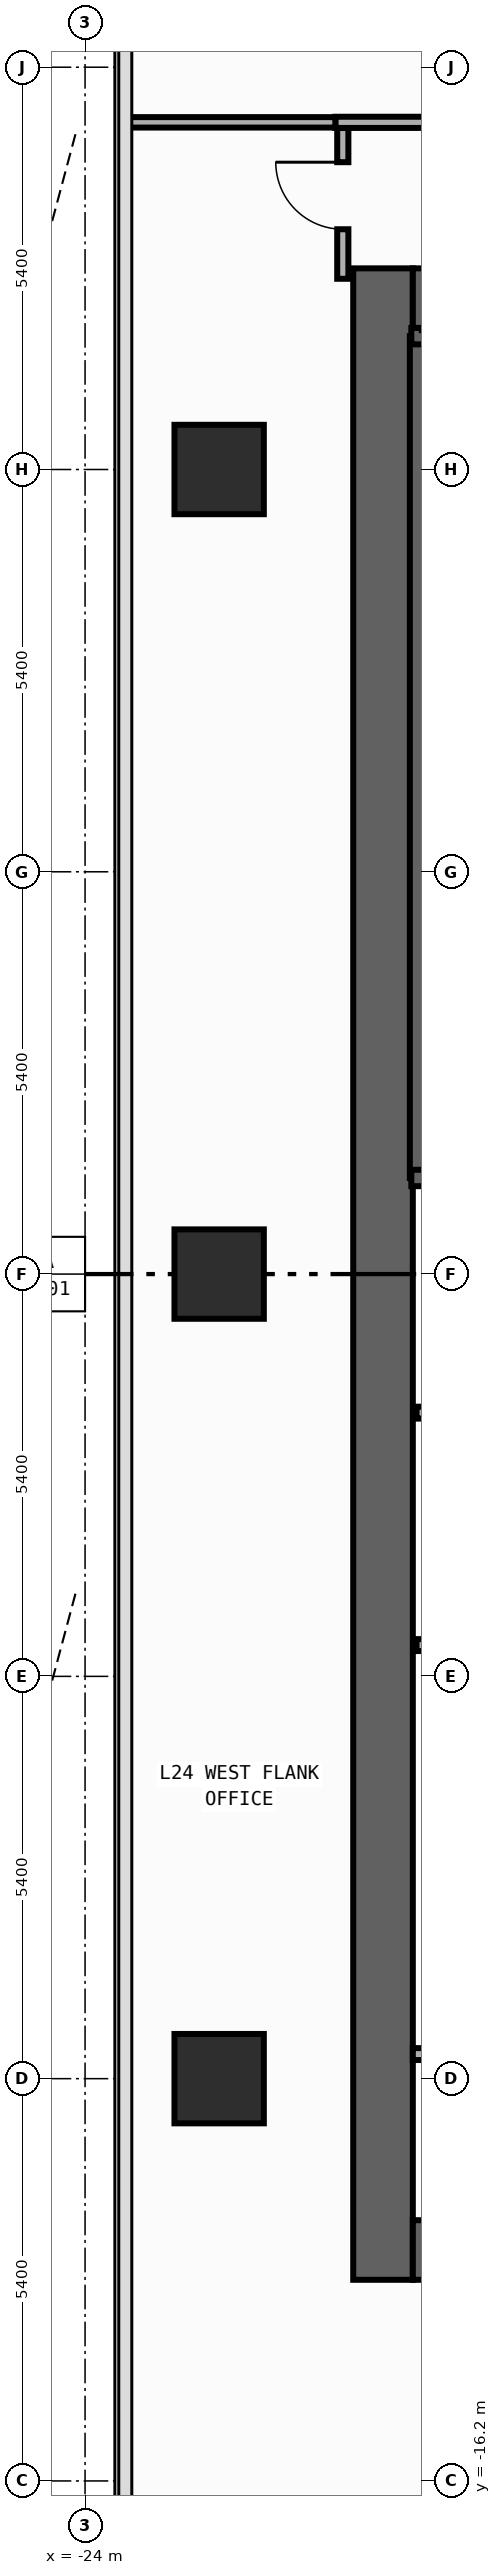
"""IFC4 building model, lengths in metres.
Left out: names, types, materials, properties, quantities, classifications, styles, units other than length and angle.
Written with IfcOpenShell. Run it as: python <this file> out.ifc"""

import sys

from ifc_helpers import new_model, si_unit, direction, frame, frame_2d, origin, origin_2d, place, context, subcontext, project, spatial, rectangle, extrude, element, fill, save


model = new_model("IFC4")
c1 = context("Model", 3, precision=1e-05, world=origin(), true_north=direction((0.0, 1.0)))
c2 = subcontext(c1, "Body", "Model", "MODEL_VIEW")
j1 = project(units=[si_unit("LENGTHUNIT", "METRE"), si_unit("PLANEANGLEUNIT", "RADIAN")], contexts=[c1])
p1 = place(None, origin())
s1 = spatial("IfcSite", under=j1, at=p1, CompositionType="ELEMENT")
p2 = place(p1, origin())
s2 = spatial("IfcBuilding", under=s1, at=p2, CompositionType="ELEMENT")
p3 = place(p2, frame((0.0, 0.0, 105.8)))
s3 = spatial("IfcBuildingStorey", under=s2, at=p3, CompositionType="ELEMENT", Elevation=105.8)
p4 = place(p3, frame((-20.0, -13.5, 0.0), z_axis=(0.0, 0.0, 1.0), x_axis=(0.0, 1.0, 0.0)))
e1 = element("IfcWall", 1, at=p4, inside=s3, PredefinedType="SHEAR", context=c2, shape_type="SweptSolid", body=[
    extrude(rectangle(XDim=27.0, YDim=0.8, at=frame_2d((13.5, 0.0))), origin(), (0.0, 0.0, 1.0), 3.94),
])
for number, where, z_axis, x_axis in (
    (2, (-19.6, -13.1, 0.0), (0.0, 0.0, 1.0), (1.0, 0.0, 0.0)),
    (3, (-19.6, 13.1, 0.0), (0.0, 0.0, 1.0), (1.0, 0.0, 0.0)),
):
    element("IfcWall", number, at=place(p3, frame(where, z_axis=z_axis, x_axis=x_axis)), inside=s3, PredefinedType="SHEAR", context=c2, shape_type="SweptSolid", body=[
        extrude(rectangle(XDim=6.8, YDim=0.8, at=frame_2d((3.4, 0.0))), origin(), (0.0, 0.0, 1.0), 3.94),
    ])
p5 = place(p3, frame((-19.53, 1.29, 0.0), z_axis=(0.0, 0.0, 1.0), x_axis=(0.0, 1.0, 0.0)))
e4 = element("IfcWall", 4, at=p5, inside=s3, PredefinedType="SHEAR", context=c2, shape_type="SweptSolid", body=[
    extrude(rectangle(XDim=11.3, YDim=0.22, at=frame_2d((5.65, 0.0))), origin(), (0.0, 0.0, 1.0), 3.94),
])
p6 = place(p3, frame((-19.62, 12.59, 0.0), z_axis=(0.0, 0.0, 1.0), x_axis=(1.0, 0.0, 0.0)))
e5 = element("IfcWall", 5, at=p6, inside=s3, PredefinedType="SHEAR", context=c2, shape_type="SweptSolid", body=[
    extrude(rectangle(XDim=3.915, YDim=0.22, at=frame_2d((1.958, 0.0))), origin(), (0.0, 0.0, 1.0), 3.94),
])
p7 = place(p3, frame((-19.62, 1.29, 0.0), z_axis=(0.0, 0.0, 1.0), x_axis=(1.0, 0.0, 0.0)))
e6 = element("IfcWall", 6, at=p7, inside=s3, PredefinedType="SHEAR", context=c2, shape_type="SweptSolid", body=[
    extrude(rectangle(XDim=3.915, YDim=0.22, at=frame_2d((1.958, 0.0))), origin(), (0.0, 0.0, 1.0), 3.94),
])
p8 = place(p7, frame((1.08, 0.0, 0.0)))
e7 = element("IfcOpeningElement", 7, at=p8, cuts=e6, PredefinedType="OPENING", context=c2, shape_type="SweptSolid", body=[
    extrude(rectangle(XDim=1.1, YDim=2.2, at=frame_2d((0.55, 1.1))), frame((0.0, 0.12, 0.0), z_axis=(0.0, -1.0, 0.0), x_axis=(1.0, 0.0, 0.0)), (0.0, 0.0, 1.0), 0.24),
])
for number, where, z_axis, x_axis in (
    (8, (-22.2, -10.8, 0.0), (0.0, 0.0, 1.0), (1.0, 0.0, 0.0)),
    (9, (-22.2, 0.0, 0.0), (0.0, 0.0, 1.0), (1.0, 0.0, 0.0)),
    (10, (-22.2, 10.8, 0.0), (0.0, 0.0, 1.0), (1.0, 0.0, 0.0)),
):
    element("IfcColumn", number, at=place(p3, frame(where, z_axis=z_axis, x_axis=x_axis)), inside=s3, PredefinedType="COLUMN", context=c2, shape_type="SweptSolid", body=[
        extrude(rectangle(XDim=1.2, YDim=1.2, at=origin_2d()), origin(), (0.0, 0.0, 1.0), 4.2),
    ])
p9 = place(p3, frame((-19.55, -1.86, 0.0), z_axis=(0.0, 0.0, 1.0), x_axis=(1.0, 0.0, 0.0)))
e11 = element("IfcWall", 11, at=p9, inside=s3, PredefinedType="STANDARD", context=c2, shape_type="SweptSolid", body=[
    extrude(rectangle(XDim=3.8, YDim=0.16, at=frame_2d((1.9, 0.0))), origin(), (0.0, 0.0, 1.0), 3.94),
])
p10 = place(p9, frame((1.18, 0.0, 0.0)))
e12 = element("IfcOpeningElement", 12, at=p10, cuts=e11, PredefinedType="OPENING", context=c2, shape_type="SweptSolid", body=[
    extrude(rectangle(XDim=1.15, YDim=2.2, at=frame_2d((0.575, 1.1))), frame((0.0, 0.09, 0.0), z_axis=(0.0, -1.0, 0.0), x_axis=(1.0, 0.0, 0.0)), (0.0, 0.0, 1.0), 0.18),
])
p11 = place(p3, frame((-19.55, -4.98, 0.0), z_axis=(0.0, 0.0, 1.0), x_axis=(1.0, 0.0, 0.0)))
e13 = element("IfcWall", 13, at=p11, inside=s3, PredefinedType="STANDARD", context=c2, shape_type="SweptSolid", body=[
    extrude(rectangle(XDim=3.8, YDim=0.16, at=frame_2d((1.9, 0.0))), origin(), (0.0, 0.0, 1.0), 3.94),
])
p12 = place(p3, frame((-19.6, -10.47, 0.0), z_axis=(0.0, 0.0, 1.0), x_axis=(1.0, 0.0, 0.0)))
e14 = element("IfcWall", 14, at=p12, inside=s3, PredefinedType="PARTITIONING", context=c2, shape_type="SweptSolid", body=[
    extrude(rectangle(XDim=2.29, YDim=0.16, at=frame_2d((1.145, 0.0))), origin(), (0.0, 0.0, 1.0), 3.94),
])
p13 = place(p3, frame((-20.54, 13.36, 0.0), z_axis=(0.0, 0.0, 1.0), x_axis=(0.0, 1.0, 0.0)))
e15 = element("IfcWall", 15, at=p13, inside=s3, PredefinedType="PARTITIONING", context=c2, shape_type="SweptSolid", body=[
    extrude(rectangle(XDim=2.025, YDim=0.15, at=frame_2d((1.012, 0.0))), origin(), (0.0, 0.0, 1.0), 3.94),
])
p14 = place(p13, frame((0.665, 0.0, 0.0)))
e16 = element("IfcOpeningElement", 16, at=p14, cuts=e15, PredefinedType="OPENING", context=c2, shape_type="SweptSolid", body=[
    extrude(rectangle(XDim=0.9, YDim=2.15, at=frame_2d((0.45, 1.075))), frame((0.0, 0.085, 0.0), z_axis=(0.0, -1.0, 0.0), x_axis=(1.0, 0.0, 0.0)), (0.0, 0.0, 1.0), 0.17),
])
p15 = place(p3, frame((-20.64, 15.46, 0.0), z_axis=(0.0, 0.0, 1.0), x_axis=(1.0, 0.0, 0.0)))
e17 = element("IfcWall", 17, at=p15, inside=s3, PredefinedType="PARTITIONING", context=c2, shape_type="SweptSolid", body=[
    extrude(rectangle(XDim=8.65, YDim=0.15, at=frame_2d((4.325, 0.0))), origin(), (0.0, 0.0, 1.0), 3.94),
])
p16 = place(p15, frame((2.871, 0.0, 0.0)))
e18 = element("IfcOpeningElement", 18, at=p16, cuts=e17, PredefinedType="OPENING", context=c2, shape_type="SweptSolid", body=[
    extrude(rectangle(XDim=0.9, YDim=2.15, at=frame_2d((0.45, 1.075))), frame((0.0, 0.085, 0.0), z_axis=(0.0, -1.0, 0.0), x_axis=(1.0, 0.0, 0.0)), (0.0, 0.0, 1.0), 0.17),
])
p17 = place(p3, frame((-23.455, 15.46, 0.0), z_axis=(0.0, 0.0, 1.0), x_axis=(1.0, 0.0, 0.0)))
e19 = element("IfcWall", 19, at=p17, inside=s3, PredefinedType="PARTITIONING", context=c2, shape_type="SweptSolid", body=[
    extrude(rectangle(XDim=2.815, YDim=0.14, at=frame_2d((1.408, 0.0))), origin(), (0.0, 0.0, 1.0), 3.94),
])
p18 = place(p14, origin())
e20 = element("IfcDoor", 20, at=p18, inside=s3, OperationType="SINGLE_SWING_RIGHT", PredefinedType="DOOR", context=c2, shape_type="SweptSolid", body=[
    extrude(rectangle(XDim=0.9, YDim=2.15, at=frame_2d((0.45, 1.075))), frame((0.0, 0.025, 0.0), z_axis=(0.0, -1.0, 0.0), x_axis=(1.0, 0.0, 0.0)), (0.0, 0.0, 1.0), 0.05),
])
fill(e16, e20)
save(model, sys.argv[1])
